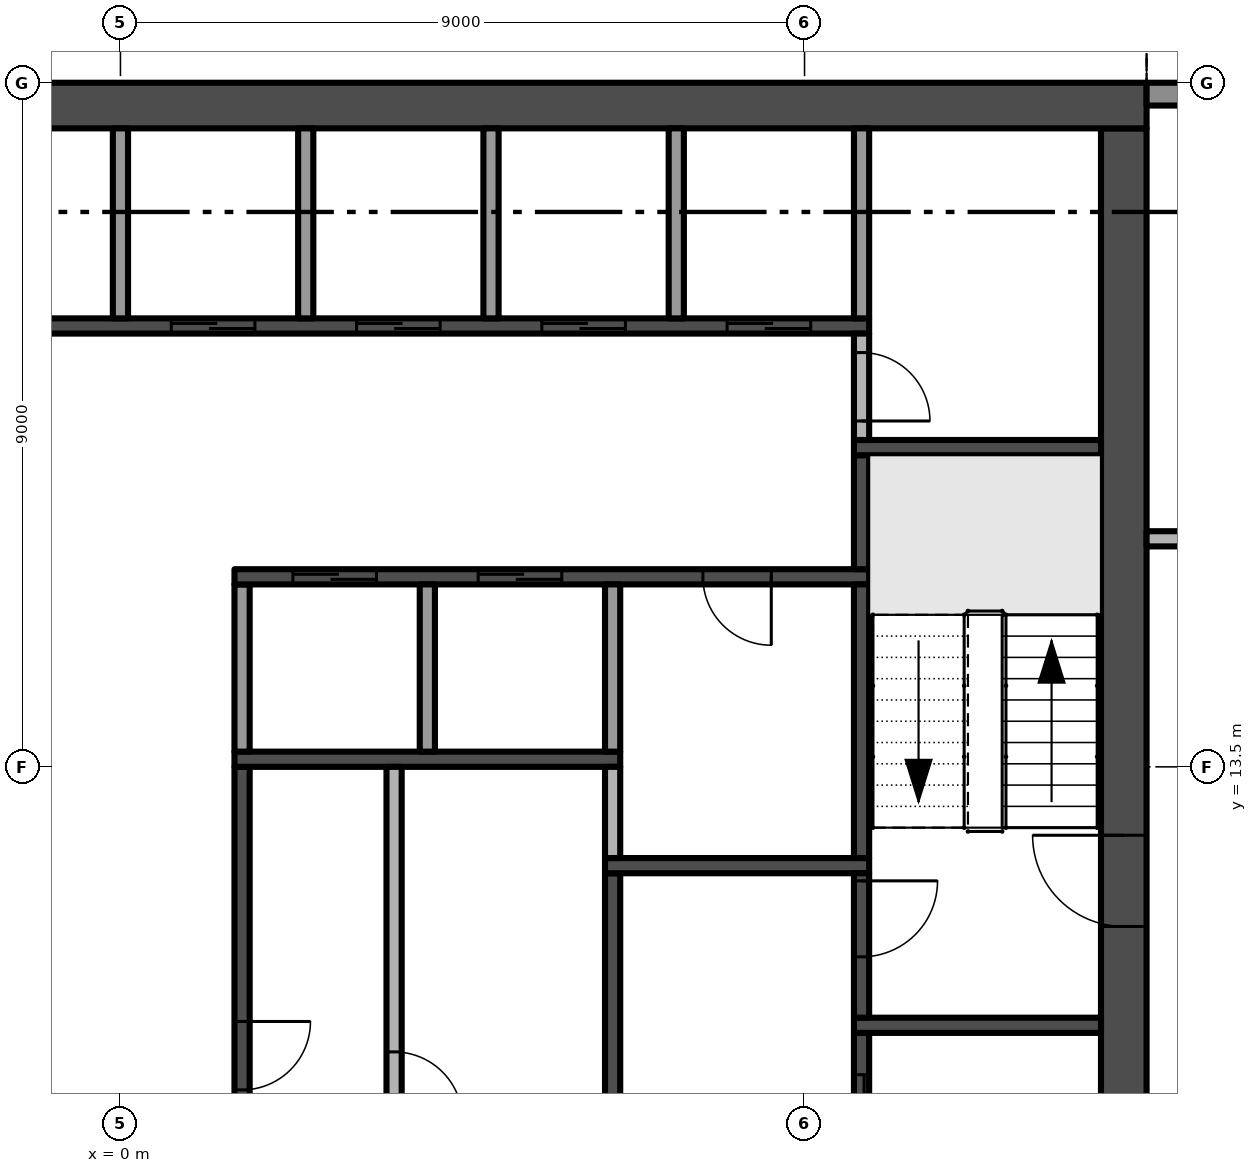
"""IFC4 building model, lengths in metres.
Left out: names, types, materials, properties, quantities, classifications, styles, units other than length and angle.
Written with IfcOpenShell. Run it as: python <this file> out.ifc"""

import sys

from ifc_helpers import new_model, si_unit, direction, frame, frame_2d, origin, place, context, subcontext, project, spatial, rectangle, extrude, element, fill, save


model = new_model("IFC4")
c1 = context("Model", 3, precision=1e-05, world=origin(), true_north=direction((0.0, 1.0)))
c2 = subcontext(c1, "Body", "Model", "MODEL_VIEW")
j1 = project(units=[si_unit("LENGTHUNIT", "METRE"), si_unit("PLANEANGLEUNIT", "RADIAN")], contexts=[c1])
p1 = place(None, origin())
s1 = spatial("IfcSite", under=j1, at=p1, CompositionType="ELEMENT")
p2 = place(p1, origin())
s2 = spatial("IfcBuilding", under=s1, at=p2, CompositionType="ELEMENT")
p3 = place(p2, frame((0.0, 0.0, 207.2)))
s3 = spatial("IfcBuildingStorey", under=s2, at=p3, CompositionType="ELEMENT", Elevation=207.2)
p4 = place(p3, frame((13.2, 5.1, -0.3), z_axis=(0.0, 0.0, 1.0), x_axis=(0.0, 1.0, 0.0)))
e1 = element("IfcWall", 1, at=p4, inside=s3, PredefinedType="SHEAR", context=c2, shape_type="SweptSolid", body=[
    extrude(rectangle(XDim=16.8, YDim=0.6, at=frame_2d((8.4, 0.0))), origin(), (0.0, 0.0, 1.0), 3.8),
])
p5 = place(p4, frame((6.3, 0.0, 0.3)))
e2 = element("IfcOpeningElement", 2, at=p5, cuts=e1, PredefinedType="OPENING", context=c2, shape_type="SweptSolid", body=[
    extrude(rectangle(XDim=1.2, YDim=2.2, at=frame_2d((0.6, 1.1))), frame((0.0, 0.31, 0.0), z_axis=(0.0, -1.0, 0.0), x_axis=(1.0, 0.0, 0.0)), (0.0, 0.0, 1.0), 0.62),
])
p6 = place(p3, frame((13.5, 22.2, -0.3), z_axis=(0.0, 0.0, 1.0), x_axis=(-1.0, 0.0, 0.0)))
e3 = element("IfcWall", 3, at=p6, inside=s3, PredefinedType="SHEAR", context=c2, shape_type="SweptSolid", body=[
    extrude(rectangle(XDim=27.0, YDim=0.6, at=frame_2d((13.5, 0.0))), origin(), (0.0, 0.0, 1.0), 3.8),
])
p7 = place(p3, frame((13.5, 22.35, 0.0), z_axis=(0.0, 0.0, 1.0), x_axis=(1.0, 0.0, 0.0)))
e4 = element("IfcWall", 4, at=p7, inside=s3, PredefinedType="SOLIDWALL", context=c2, shape_type="SweptSolid", body=[
    extrude(rectangle(XDim=4.0, YDim=0.3, at=frame_2d((2.0, 0.0))), origin(), (0.0, 0.0, 1.0), 3.5),
])
p8 = place(p7, frame((0.625, 0.0, 0.0)))
e5 = element("IfcOpeningElement", 5, at=p8, cuts=e4, PredefinedType="OPENING", context=c2, shape_type="SweptSolid", body=[
    extrude(rectangle(XDim=3.075, YDim=2.4, at=frame_2d((1.538, 1.2))), frame((0.0, 0.16, 0.0), z_axis=(0.0, -1.0, 0.0), x_axis=(1.0, 0.0, 0.0)), (0.0, 0.0, 1.0), 0.32),
])
p9 = place(p3, frame((-9.85, 19.3, 0.0), z_axis=(0.0, 0.0, 1.0), x_axis=(1.0, 0.0, 0.0)))
e6 = element("IfcWall", 6, at=p9, inside=s3, PredefinedType="SHEAR", context=c2, shape_type="SweptSolid", body=[
    extrude(rectangle(XDim=19.7, YDim=0.2, at=frame_2d((9.85, 0.0))), origin(), (0.0, 0.0, 1.0), 3.5),
])
p10 = place(p9, frame((10.519, 0.0, 0.0)))
e7 = element("IfcOpeningElement", 7, at=p10, cuts=e6, PredefinedType="OPENING", context=c2, shape_type="SweptSolid", body=[
    extrude(rectangle(XDim=1.1, YDim=2.1, at=frame_2d((0.55, 1.05))), frame((0.0, 0.11, 0.0), z_axis=(0.0, -1.0, 0.0), x_axis=(1.0, 0.0, 0.0)), (0.0, 0.0, 1.0), 0.22),
])
p11 = place(p9, frame((12.956, 0.0, 0.0)))
e8 = element("IfcOpeningElement", 8, at=p11, cuts=e6, PredefinedType="OPENING", context=c2, shape_type="SweptSolid", body=[
    extrude(rectangle(XDim=1.1, YDim=2.1, at=frame_2d((0.55, 1.05))), frame((0.0, 0.11, 0.0), z_axis=(0.0, -1.0, 0.0), x_axis=(1.0, 0.0, 0.0)), (0.0, 0.0, 1.0), 0.22),
])
p12 = place(p9, frame((15.394, 0.0, 0.0)))
e9 = element("IfcOpeningElement", 9, at=p12, cuts=e6, PredefinedType="OPENING", context=c2, shape_type="SweptSolid", body=[
    extrude(rectangle(XDim=1.1, YDim=2.1, at=frame_2d((0.55, 1.05))), frame((0.0, 0.11, 0.0), z_axis=(0.0, -1.0, 0.0), x_axis=(1.0, 0.0, 0.0)), (0.0, 0.0, 1.0), 0.22),
])
p13 = place(p9, frame((17.831, 0.0, 0.0)))
e10 = element("IfcOpeningElement", 10, at=p13, cuts=e6, PredefinedType="OPENING", context=c2, shape_type="SweptSolid", body=[
    extrude(rectangle(XDim=1.1, YDim=2.1, at=frame_2d((0.55, 1.05))), frame((0.0, 0.11, 0.0), z_axis=(0.0, -1.0, 0.0), x_axis=(1.0, 0.0, 0.0)), (0.0, 0.0, 1.0), 0.22),
])
p14 = place(p9, frame((2.087, 0.0, 0.0)))
e11 = element("IfcOpeningElement", 11, at=p14, cuts=e6, PredefinedType="OPENING", context=c2, shape_type="SweptSolid", body=[
    extrude(rectangle(XDim=0.9, YDim=2.1, at=frame_2d((0.45, 1.05))), frame((0.0, 0.11, 0.0), z_axis=(0.0, -1.0, 0.0), x_axis=(1.0, 0.0, 0.0)), (0.0, 0.0, 1.0), 0.22),
])
p15 = place(p9, frame((6.963, 0.0, 0.0)))
e12 = element("IfcOpeningElement", 12, at=p15, cuts=e6, PredefinedType="OPENING", context=c2, shape_type="SweptSolid", body=[
    extrude(rectangle(XDim=0.9, YDim=2.1, at=frame_2d((0.45, 1.05))), frame((0.0, 0.11, 0.0), z_axis=(0.0, -1.0, 0.0), x_axis=(1.0, 0.0, 0.0)), (0.0, 0.0, 1.0), 0.22),
])
p16 = place(p3, frame((0.0, 19.4, 0.0), z_axis=(0.0, 0.0, 1.0), x_axis=(0.0, 1.0, 0.0)))
e13 = element("IfcWall", 13, at=p16, inside=s3, PredefinedType="PARTITIONING", context=c2, shape_type="SweptSolid", body=[
    extrude(rectangle(XDim=2.5, YDim=0.2, at=frame_2d((1.25, 0.0))), origin(), (0.0, 0.0, 1.0), 3.5),
])
p17 = place(p3, frame((1.6, 13.5, 0.0), z_axis=(0.0, 0.0, 1.0), x_axis=(0.0, -1.0, 0.0)))
e14 = element("IfcWall", 14, at=p17, inside=s3, PredefinedType="SHEAR", context=c2, shape_type="SweptSolid", body=[
    extrude(rectangle(XDim=8.4, YDim=0.2, at=frame_2d((4.2, 0.0))), origin(), (0.0, 0.0, 1.0), 3.5),
])
p18 = place(p17, frame((3.35, 0.0, 0.0)))
e15 = element("IfcOpeningElement", 15, at=p18, cuts=e14, PredefinedType="OPENING", context=c2, shape_type="SweptSolid", body=[
    extrude(rectangle(XDim=0.9, YDim=2.1, at=frame_2d((0.45, 1.05))), frame((0.0, 0.11, 0.0), z_axis=(0.0, -1.0, 0.0), x_axis=(1.0, 0.0, 0.0)), (0.0, 0.0, 1.0), 0.22),
])
p19 = place(p3, frame((1.5, 13.6, 0.0), z_axis=(0.0, 0.0, 1.0), x_axis=(1.0, 0.0, 0.0)))
e16 = element("IfcWall", 16, at=p19, inside=s3, PredefinedType="SHEAR", context=c2, shape_type="SweptSolid", body=[
    extrude(rectangle(XDim=5.075, YDim=0.2, at=frame_2d((2.538, 0.0))), origin(), (0.0, 0.0, 1.0), 3.5),
])
p20 = place(p3, frame((1.6, 13.7, 0.0), z_axis=(0.0, 0.0, 1.0), x_axis=(0.0, 1.0, 0.0)))
e17 = element("IfcWall", 17, at=p20, inside=s3, PredefinedType="PARTITIONING", context=c2, shape_type="SweptSolid", body=[
    extrude(rectangle(XDim=2.2, YDim=0.2, at=frame_2d((1.1, 0.0))), origin(), (0.0, 0.0, 1.0), 3.5),
])
p21 = place(p3, frame((9.85, 16.0, 0.0), z_axis=(0.0, 0.0, 1.0), x_axis=(-1.0, 0.0, 0.0)))
e18 = element("IfcWall", 18, at=p21, inside=s3, PredefinedType="SHEAR", context=c2, shape_type="SweptSolid", body=[
    extrude(rectangle(XDim=8.35, YDim=0.2, at=frame_2d((4.175, 0.0))), origin(), (0.0, 0.0, 1.0), 3.5),
])
p22 = place(p21, frame((6.481, 0.0, 0.0)))
e19 = element("IfcOpeningElement", 19, at=p22, cuts=e18, PredefinedType="OPENING", context=c2, shape_type="SweptSolid", body=[
    extrude(rectangle(XDim=1.1, YDim=2.1, at=frame_2d((0.55, 1.05))), frame((0.0, 0.11, 0.0), z_axis=(0.0, -1.0, 0.0), x_axis=(1.0, 0.0, 0.0)), (0.0, 0.0, 1.0), 0.22),
])
p23 = place(p21, frame((4.044, 0.0, 0.0)))
e20 = element("IfcOpeningElement", 20, at=p23, cuts=e18, PredefinedType="OPENING", context=c2, shape_type="SweptSolid", body=[
    extrude(rectangle(XDim=1.1, YDim=2.1, at=frame_2d((0.55, 1.05))), frame((0.0, 0.11, 0.0), z_axis=(0.0, -1.0, 0.0), x_axis=(1.0, 0.0, 0.0)), (0.0, 0.0, 1.0), 0.22),
])
p24 = place(p21, frame((1.288, 0.0, 0.0)))
e21 = element("IfcOpeningElement", 21, at=p24, cuts=e18, PredefinedType="OPENING", context=c2, shape_type="SweptSolid", body=[
    extrude(rectangle(XDim=0.9, YDim=2.1, at=frame_2d((0.45, 1.05))), frame((0.0, 0.11, 0.0), z_axis=(0.0, -1.0, 0.0), x_axis=(1.0, 0.0, 0.0)), (0.0, 0.0, 1.0), 0.22),
])
p25 = place(p3, frame((2.438, 19.4, 0.0), z_axis=(0.0, 0.0, 1.0), x_axis=(0.0, 1.0, 0.0)))
e22 = element("IfcWall", 22, at=p25, inside=s3, PredefinedType="PARTITIONING", context=c2, shape_type="SweptSolid", body=[
    extrude(rectangle(XDim=2.5, YDim=0.2, at=frame_2d((1.25, 0.0))), origin(), (0.0, 0.0, 1.0), 3.5),
])
p26 = place(p3, frame((3.6, 13.5, 0.0), z_axis=(0.0, 0.0, 1.0), x_axis=(0.0, -1.0, 0.0)))
e23 = element("IfcWall", 23, at=p26, inside=s3, PredefinedType="PARTITIONING", context=c2, shape_type="SweptSolid", body=[
    extrude(rectangle(XDim=8.4, YDim=0.2, at=frame_2d((4.2, 0.0))), origin(), (0.0, 0.0, 1.0), 3.5),
])
p27 = place(p26, frame((3.75, 0.0, 0.0)))
e24 = element("IfcOpeningElement", 24, at=p27, cuts=e23, PredefinedType="OPENING", context=c2, shape_type="SweptSolid", body=[
    extrude(rectangle(XDim=0.9, YDim=2.1, at=frame_2d((0.45, 1.05))), frame((0.0, 0.11, 0.0), z_axis=(0.0, -1.0, 0.0), x_axis=(1.0, 0.0, 0.0)), (0.0, 0.0, 1.0), 0.22),
])
p28 = place(p3, frame((4.037, 13.7, 0.0), z_axis=(0.0, 0.0, 1.0), x_axis=(0.0, 1.0, 0.0)))
e25 = element("IfcWall", 25, at=p28, inside=s3, PredefinedType="PARTITIONING", context=c2, shape_type="SweptSolid", body=[
    extrude(rectangle(XDim=2.2, YDim=0.2, at=frame_2d((1.1, 0.0))), origin(), (0.0, 0.0, 1.0), 3.5),
])
p29 = place(p3, frame((4.875, 19.4, 0.0), z_axis=(0.0, 0.0, 1.0), x_axis=(0.0, 1.0, 0.0)))
e26 = element("IfcWall", 26, at=p29, inside=s3, PredefinedType="PARTITIONING", context=c2, shape_type="SweptSolid", body=[
    extrude(rectangle(XDim=2.5, YDim=0.2, at=frame_2d((1.25, 0.0))), origin(), (0.0, 0.0, 1.0), 3.5),
])
p30 = place(p3, frame((6.475, 5.1, 0.0), z_axis=(0.0, 0.0, 1.0), x_axis=(0.0, 1.0, 0.0)))
e27 = element("IfcWall", 27, at=p30, inside=s3, PredefinedType="SHEAR", context=c2, shape_type="SweptSolid", body=[
    extrude(rectangle(XDim=7.0, YDim=0.2, at=frame_2d((3.5, 0.0))), origin(), (0.0, 0.0, 1.0), 3.5),
])
p31 = place(p3, frame((6.375, 12.2, 0.0), z_axis=(0.0, 0.0, 1.0), x_axis=(1.0, 0.0, 0.0)))
e28 = element("IfcWall", 28, at=p31, inside=s3, PredefinedType="SHEAR", context=c2, shape_type="SweptSolid", body=[
    extrude(rectangle(XDim=3.475, YDim=0.2, at=frame_2d((1.738, 0.0))), origin(), (0.0, 0.0, 1.0), 3.5),
])
p32 = place(p3, frame((6.475, 12.3, 0.0), z_axis=(0.0, 0.0, 1.0), x_axis=(0.0, 1.0, 0.0)))
e29 = element("IfcWall", 29, at=p32, inside=s3, PredefinedType="PARTITIONING", context=c2, shape_type="SweptSolid", body=[
    extrude(rectangle(XDim=1.2, YDim=0.2, at=frame_2d((0.6, 0.0))), origin(), (0.0, 0.0, 1.0), 3.5),
])
p33 = place(p3, frame((6.475, 13.7, 0.0), z_axis=(0.0, 0.0, 1.0), x_axis=(0.0, 1.0, 0.0)))
e30 = element("IfcWall", 30, at=p33, inside=s3, PredefinedType="PARTITIONING", context=c2, shape_type="SweptSolid", body=[
    extrude(rectangle(XDim=2.2, YDim=0.2, at=frame_2d((1.1, 0.0))), origin(), (0.0, 0.0, 1.0), 3.5),
])
p34 = place(p3, frame((7.312, 19.4, 0.0), z_axis=(0.0, 0.0, 1.0), x_axis=(0.0, 1.0, 0.0)))
e31 = element("IfcWall", 31, at=p34, inside=s3, PredefinedType="PARTITIONING", context=c2, shape_type="SweptSolid", body=[
    extrude(rectangle(XDim=2.5, YDim=0.2, at=frame_2d((1.25, 0.0))), origin(), (0.0, 0.0, 1.0), 3.5),
])
p35 = place(p3, frame((9.75, 7.8, 0.0), z_axis=(0.0, 0.0, 1.0), x_axis=(0.0, 1.0, 0.0)))
e32 = element("IfcWall", 32, at=p35, inside=s3, PredefinedType="SHEAR", context=c2, shape_type="SweptSolid", body=[
    extrude(rectangle(XDim=2.2, YDim=0.2, at=frame_2d((1.1, 0.0))), origin(), (0.0, 0.0, 1.0), 3.5),
])
p36 = place(p35, frame((0.55, 0.0, 0.0)))
e33 = element("IfcOpeningElement", 33, at=p36, cuts=e32, PredefinedType="OPENING", context=c2, shape_type="SweptSolid", body=[
    extrude(rectangle(XDim=1.1, YDim=2.1, at=frame_2d((0.55, 1.05))), frame((0.0, 0.11, 0.0), z_axis=(0.0, -1.0, 0.0), x_axis=(1.0, 0.0, 0.0)), (0.0, 0.0, 1.0), 0.22),
])
p37 = place(p3, frame((9.65, 10.1, 0.0), z_axis=(0.0, 0.0, 1.0), x_axis=(1.0, 0.0, 0.0)))
e34 = element("IfcWall", 34, at=p37, inside=s3, PredefinedType="SHEAR", context=c2, shape_type="SweptSolid", body=[
    extrude(rectangle(XDim=3.25, YDim=0.2, at=frame_2d((1.625, 0.0))), origin(), (0.0, 0.0, 1.0), 3.5),
])
p38 = place(p3, frame((9.75, 12.1, 0.0), z_axis=(0.0, 0.0, 1.0), x_axis=(0.0, -1.0, 0.0)))
e35 = element("IfcWall", 35, at=p38, inside=s3, PredefinedType="SHEAR", context=c2, shape_type="SweptSolid", body=[
    extrude(rectangle(XDim=1.9, YDim=0.2, at=frame_2d((0.95, 0.0))), origin(), (0.0, 0.0, 1.0), 3.5),
])
p39 = place(p38, frame((0.1, 0.0, 0.0)))
e36 = element("IfcOpeningElement", 36, at=p39, cuts=e35, PredefinedType="OPENING", context=c2, shape_type="SweptSolid", body=[
    extrude(rectangle(XDim=1.0, YDim=2.2, at=frame_2d((0.5, 1.1))), frame((0.0, 0.11, 0.0), z_axis=(0.0, -1.0, 0.0), x_axis=(1.0, 0.0, 0.0)), (0.0, 0.0, 1.0), 0.22),
])
p40 = place(p3, frame((9.75, 12.3, 0.0), z_axis=(0.0, 0.0, 1.0), x_axis=(0.0, 1.0, 0.0)))
e37 = element("IfcWall", 37, at=p40, inside=s3, PredefinedType="SHEAR", context=c2, shape_type="SweptSolid", body=[
    extrude(rectangle(XDim=3.6, YDim=0.2, at=frame_2d((1.8, 0.0))), origin(), (0.0, 0.0, 1.0), 3.5),
])
p41 = place(p3, frame((9.75, 16.1, 0.0), z_axis=(0.0, 0.0, 1.0), x_axis=(0.0, 1.0, 0.0)))
e38 = element("IfcWall", 38, at=p41, inside=s3, PredefinedType="SHEAR", context=c2, shape_type="SweptSolid", body=[
    extrude(rectangle(XDim=1.5, YDim=0.2, at=frame_2d((0.75, 0.0))), origin(), (0.0, 0.0, 1.0), 3.5),
])
p42 = place(p3, frame((9.65, 17.7, 0.0), z_axis=(0.0, 0.0, 1.0), x_axis=(1.0, 0.0, 0.0)))
e39 = element("IfcWall", 39, at=p42, inside=s3, PredefinedType="SHEAR", context=c2, shape_type="SweptSolid", body=[
    extrude(rectangle(XDim=3.25, YDim=0.2, at=frame_2d((1.625, 0.0))), origin(), (0.0, 0.0, 1.0), 3.5),
])
p43 = place(p3, frame((9.75, 19.2, 0.0), z_axis=(0.0, 0.0, 1.0), x_axis=(0.0, -1.0, 0.0)))
e40 = element("IfcWall", 40, at=p43, inside=s3, PredefinedType="PARTITIONING", context=c2, shape_type="SweptSolid", body=[
    extrude(rectangle(XDim=1.4, YDim=0.2, at=frame_2d((0.7, 0.0))), origin(), (0.0, 0.0, 1.0), 3.5),
])
p44 = place(p43, frame((0.25, 0.0, 0.0)))
e41 = element("IfcOpeningElement", 41, at=p44, cuts=e40, PredefinedType="OPENING", context=c2, shape_type="SweptSolid", body=[
    extrude(rectangle(XDim=0.9, YDim=2.1, at=frame_2d((0.45, 1.05))), frame((0.0, 0.11, 0.0), z_axis=(0.0, -1.0, 0.0), x_axis=(1.0, 0.0, 0.0)), (0.0, 0.0, 1.0), 0.22),
])
p45 = place(p3, frame((9.75, 19.4, 0.0), z_axis=(0.0, 0.0, 1.0), x_axis=(0.0, 1.0, 0.0)))
e42 = element("IfcWall", 42, at=p45, inside=s3, PredefinedType="PARTITIONING", context=c2, shape_type="SweptSolid", body=[
    extrude(rectangle(XDim=2.5, YDim=0.2, at=frame_2d((1.25, 0.0))), origin(), (0.0, 0.0, 1.0), 3.5),
])
p46 = place(p3, frame((13.5, 16.5, 0.0), z_axis=(0.0, 0.0, 1.0), x_axis=(1.0, 0.0, 0.0)))
e43 = element("IfcWall", 43, at=p46, inside=s3, PredefinedType="PARTITIONING", context=c2, shape_type="SweptSolid", body=[
    extrude(rectangle(XDim=3.825, YDim=0.2, at=frame_2d((1.913, 0.0))), origin(), (0.0, 0.0, 1.0), 3.5),
])
p47 = place(p46, frame((1.55, 0.0, 0.0)))
e44 = element("IfcOpeningElement", 44, at=p47, cuts=e43, PredefinedType="OPENING", context=c2, shape_type="SweptSolid", body=[
    extrude(rectangle(XDim=0.9, YDim=2.1, at=frame_2d((0.45, 1.05))), frame((0.0, 0.11, 0.0), z_axis=(0.0, -1.0, 0.0), x_axis=(1.0, 0.0, 0.0)), (0.0, 0.0, 1.0), 0.22),
])
p48 = place(p5, frame((1.2, 0.0, 0.0), z_axis=(0.0, 0.0, 1.0), x_axis=(-1.0, 0.0, 0.0)))
e45 = element("IfcDoor", 45, at=p48, inside=s3, OperationType="SINGLE_SWING_LEFT", PredefinedType="DOOR", context=c2, shape_type="SweptSolid", body=[
    extrude(rectangle(XDim=1.2, YDim=2.2, at=frame_2d((0.6, 1.1))), frame((0.0, 0.025, 0.0), z_axis=(0.0, -1.0, 0.0), x_axis=(1.0, 0.0, 0.0)), (0.0, 0.0, 1.0), 0.05),
])
fill(e2, e45)
p49 = place(p39, origin())
e46 = element("IfcDoor", 46, at=p49, inside=s3, OperationType="SINGLE_SWING_LEFT", PredefinedType="DOOR", context=c2, shape_type="SweptSolid", body=[
    extrude(rectangle(XDim=1.0, YDim=2.2, at=frame_2d((0.5, 1.1))), frame((0.0, 0.025, 0.0), z_axis=(0.0, -1.0, 0.0), x_axis=(1.0, 0.0, 0.0)), (0.0, 0.0, 1.0), 0.05),
])
fill(e36, e46)
p50 = place(p10, origin())
e47 = element("IfcDoor", 47, at=p50, inside=s3, OperationType="SLIDING_TO_RIGHT", PredefinedType="DOOR", context=c2, shape_type="SweptSolid", body=[
    extrude(rectangle(XDim=1.1, YDim=2.1, at=frame_2d((0.55, 1.05))), frame((0.0, 0.025, 0.0), z_axis=(0.0, -1.0, 0.0), x_axis=(1.0, 0.0, 0.0)), (0.0, 0.0, 1.0), 0.05),
])
fill(e7, e47)
p51 = place(p11, origin())
e48 = element("IfcDoor", 48, at=p51, inside=s3, OperationType="SLIDING_TO_RIGHT", PredefinedType="DOOR", context=c2, shape_type="SweptSolid", body=[
    extrude(rectangle(XDim=1.1, YDim=2.1, at=frame_2d((0.55, 1.05))), frame((0.0, 0.025, 0.0), z_axis=(0.0, -1.0, 0.0), x_axis=(1.0, 0.0, 0.0)), (0.0, 0.0, 1.0), 0.05),
])
fill(e8, e48)
p52 = place(p12, origin())
e49 = element("IfcDoor", 49, at=p52, inside=s3, OperationType="SLIDING_TO_RIGHT", PredefinedType="DOOR", context=c2, shape_type="SweptSolid", body=[
    extrude(rectangle(XDim=1.1, YDim=2.1, at=frame_2d((0.55, 1.05))), frame((0.0, 0.025, 0.0), z_axis=(0.0, -1.0, 0.0), x_axis=(1.0, 0.0, 0.0)), (0.0, 0.0, 1.0), 0.05),
])
fill(e9, e49)
p53 = place(p13, origin())
e50 = element("IfcDoor", 50, at=p53, inside=s3, OperationType="SLIDING_TO_RIGHT", PredefinedType="DOOR", context=c2, shape_type="SweptSolid", body=[
    extrude(rectangle(XDim=1.1, YDim=2.1, at=frame_2d((0.55, 1.05))), frame((0.0, 0.025, 0.0), z_axis=(0.0, -1.0, 0.0), x_axis=(1.0, 0.0, 0.0)), (0.0, 0.0, 1.0), 0.05),
])
fill(e10, e50)
p54 = place(p22, origin())
e51 = element("IfcDoor", 51, at=p54, inside=s3, OperationType="SLIDING_TO_RIGHT", PredefinedType="DOOR", context=c2, shape_type="SweptSolid", body=[
    extrude(rectangle(XDim=1.1, YDim=2.1, at=frame_2d((0.55, 1.05))), frame((0.0, 0.025, 0.0), z_axis=(0.0, -1.0, 0.0), x_axis=(1.0, 0.0, 0.0)), (0.0, 0.0, 1.0), 0.05),
])
fill(e19, e51)
p55 = place(p23, origin())
e52 = element("IfcDoor", 52, at=p55, inside=s3, OperationType="SLIDING_TO_RIGHT", PredefinedType="DOOR", context=c2, shape_type="SweptSolid", body=[
    extrude(rectangle(XDim=1.1, YDim=2.1, at=frame_2d((0.55, 1.05))), frame((0.0, 0.025, 0.0), z_axis=(0.0, -1.0, 0.0), x_axis=(1.0, 0.0, 0.0)), (0.0, 0.0, 1.0), 0.05),
])
fill(e20, e52)
p56 = place(p36, origin())
e53 = element("IfcDoor", 53, at=p56, inside=s3, OperationType="SLIDING_TO_RIGHT", PredefinedType="DOOR", context=c2, shape_type="SweptSolid", body=[
    extrude(rectangle(XDim=1.1, YDim=2.1, at=frame_2d((0.55, 1.05))), frame((0.0, 0.025, 0.0), z_axis=(0.0, -1.0, 0.0), x_axis=(1.0, 0.0, 0.0)), (0.0, 0.0, 1.0), 0.05),
])
fill(e33, e53)
p57 = place(p18, origin())
e54 = element("IfcDoor", 54, at=p57, inside=s3, OperationType="SINGLE_SWING_LEFT", PredefinedType="DOOR", context=c2, shape_type="SweptSolid", body=[
    extrude(rectangle(XDim=0.9, YDim=2.1, at=frame_2d((0.45, 1.05))), frame((0.0, 0.025, 0.0), z_axis=(0.0, -1.0, 0.0), x_axis=(1.0, 0.0, 0.0)), (0.0, 0.0, 1.0), 0.05),
])
fill(e15, e54)
p58 = place(p24, origin())
e55 = element("IfcDoor", 55, at=p58, inside=s3, OperationType="SINGLE_SWING_LEFT", PredefinedType="DOOR", context=c2, shape_type="SweptSolid", body=[
    extrude(rectangle(XDim=0.9, YDim=2.1, at=frame_2d((0.45, 1.05))), frame((0.0, 0.025, 0.0), z_axis=(0.0, -1.0, 0.0), x_axis=(1.0, 0.0, 0.0)), (0.0, 0.0, 1.0), 0.05),
])
fill(e21, e55)
p59 = place(p44, origin())
e56 = element("IfcDoor", 56, at=p59, inside=s3, OperationType="SINGLE_SWING_RIGHT", PredefinedType="DOOR", context=c2, shape_type="SweptSolid", body=[
    extrude(rectangle(XDim=0.9, YDim=2.1, at=frame_2d((0.45, 1.05))), frame((0.0, 0.025, 0.0), z_axis=(0.0, -1.0, 0.0), x_axis=(1.0, 0.0, 0.0)), (0.0, 0.0, 1.0), 0.05),
])
fill(e41, e56)
p60 = place(p27, origin())
e57 = element("IfcDoor", 57, at=p60, inside=s3, OperationType="SINGLE_SWING_RIGHT", PredefinedType="DOOR", context=c2, shape_type="SweptSolid", body=[
    extrude(rectangle(XDim=0.9, YDim=2.1, at=frame_2d((0.45, 1.05))), frame((0.0, 0.025, 0.0), z_axis=(0.0, -1.0, 0.0), x_axis=(1.0, 0.0, 0.0)), (0.0, 0.0, 1.0), 0.05),
])
fill(e24, e57)
save(model, sys.argv[1])
